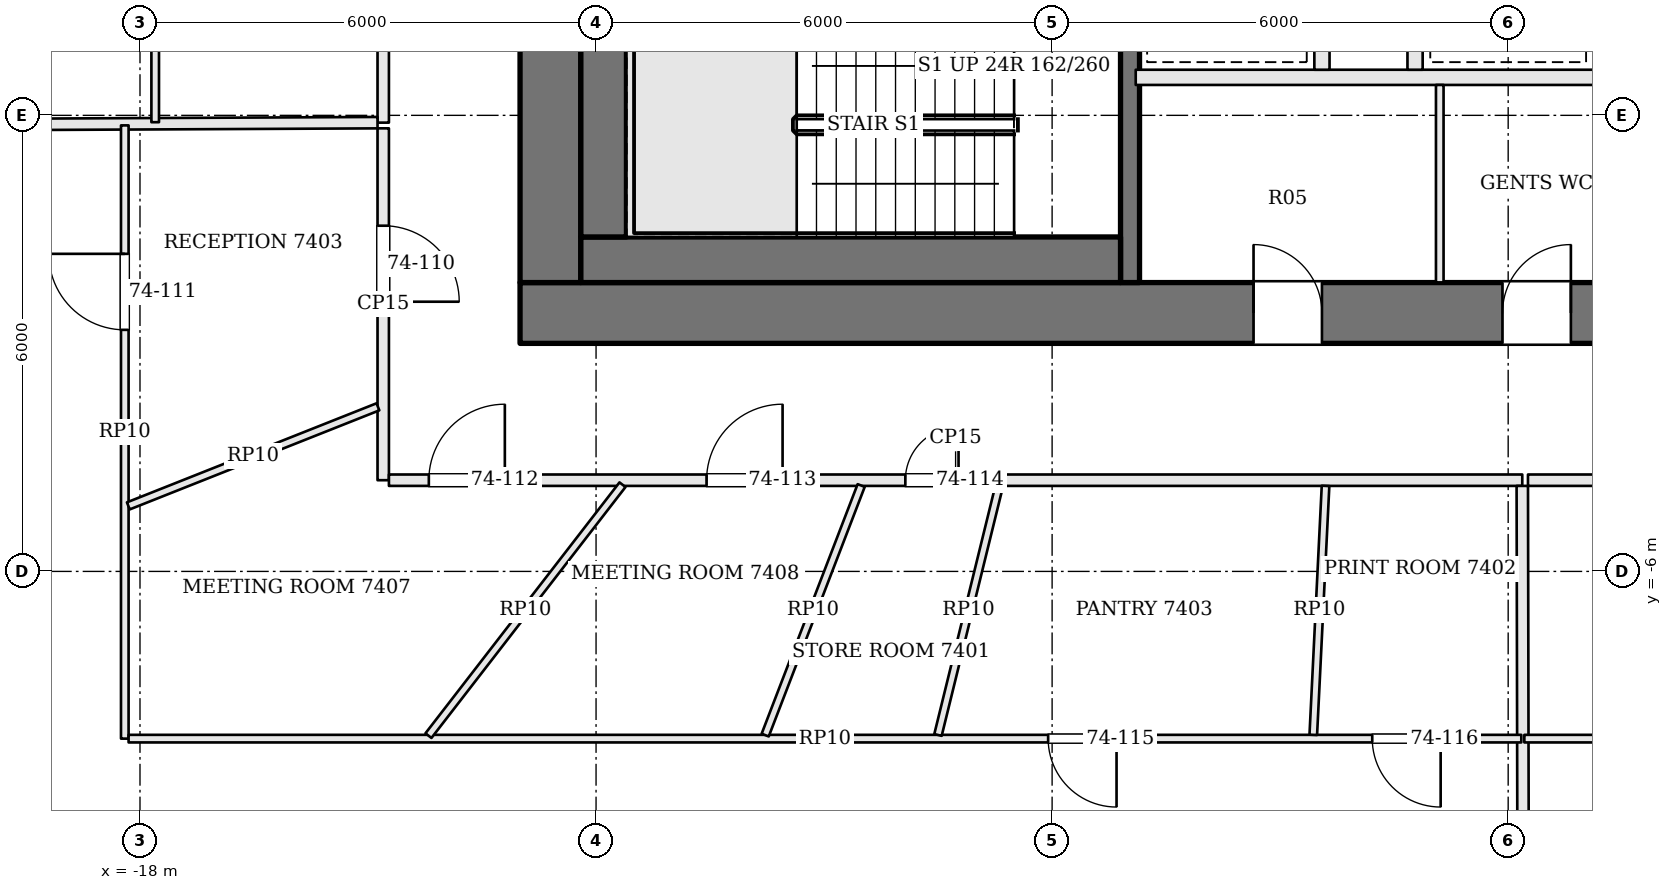
"""IFC4 building model, lengths in metres.
Left out: names, types, materials, properties, quantities, classifications, styles, units other than length and angle.
Written with IfcOpenShell. Run it as: python <this file> out.ifc"""

import sys

from ifc_helpers import new_model, si_unit, direction, frame, frame_2d, origin, place, context, subcontext, project, spatial, rectangle, extrude, element, fill, save


model = new_model("IFC4")
c1 = context("Model", 3, precision=1e-05, world=origin(), true_north=direction((0.0, 1.0)))
c2 = subcontext(c1, "Body", "Model", "MODEL_VIEW")
j1 = project(units=[si_unit("LENGTHUNIT", "METRE"), si_unit("PLANEANGLEUNIT", "RADIAN")], contexts=[c1])
p1 = place(None, origin())
s1 = spatial("IfcSite", under=j1, at=p1, CompositionType="ELEMENT")
p2 = place(p1, origin())
s2 = spatial("IfcBuilding", under=s1, at=p2, CompositionType="ELEMENT")
p3 = place(p2, frame((0.0, 0.0, 300.0)))
s3 = spatial("IfcBuildingStorey", under=s2, at=p3, CompositionType="ELEMENT", Elevation=300.0)
p4 = place(p3, frame((-13.0, -2.6, 0.0), z_axis=(0.0, 0.0, 1.0), x_axis=(1.0, 0.0, 0.0)))
e1 = element("IfcWall", 1, at=p4, inside=s3, PredefinedType="SHEAR", context=c2, shape_type="SweptSolid", body=[
    extrude(rectangle(XDim=26.0, YDim=0.8, at=frame_2d((13.0, 0.0))), origin(), (0.0, 0.0, 1.0), 3.9),
])
p5 = place(p4, frame((9.65, 0.0, 0.0)))
e2 = element("IfcOpeningElement", 2, at=p5, cuts=e1, PredefinedType="OPENING", context=c2, shape_type="SweptSolid", body=[
    extrude(rectangle(XDim=0.9, YDim=2.1, at=frame_2d((0.45, 1.05))), frame((0.0, 0.41, 0.0), z_axis=(0.0, -1.0, 0.0), x_axis=(1.0, 0.0, 0.0)), (0.0, 0.0, 1.0), 0.82),
])
p6 = place(p4, frame((12.925, 0.0, 0.0)))
e3 = element("IfcOpeningElement", 3, at=p6, cuts=e1, PredefinedType="OPENING", context=c2, shape_type="SweptSolid", body=[
    extrude(rectangle(XDim=0.9, YDim=2.1, at=frame_2d((0.45, 1.05))), frame((0.0, 0.41, 0.0), z_axis=(0.0, -1.0, 0.0), x_axis=(1.0, 0.0, 0.0)), (0.0, 0.0, 1.0), 0.82),
])
p7 = place(p4, frame((15.05, 0.0, 0.0)))
e4 = element("IfcOpeningElement", 4, at=p7, cuts=e1, PredefinedType="OPENING", context=c2, shape_type="SweptSolid", body=[
    extrude(rectangle(XDim=1.0, YDim=2.1, at=frame_2d((0.5, 1.05))), frame((0.0, 0.41, 0.0), z_axis=(0.0, -1.0, 0.0), x_axis=(1.0, 0.0, 0.0)), (0.0, 0.0, 1.0), 0.82),
])
p8 = place(p4, frame((16.825, 0.0, 0.0)))
e5 = element("IfcOpeningElement", 5, at=p8, cuts=e1, PredefinedType="OPENING", context=c2, shape_type="SweptSolid", body=[
    extrude(rectangle(XDim=0.7, YDim=2.1, at=frame_2d((0.35, 1.05))), frame((0.0, 0.41, 0.0), z_axis=(0.0, -1.0, 0.0), x_axis=(1.0, 0.0, 0.0)), (0.0, 0.0, 1.0), 0.82),
])
p9 = place(p3, frame((-12.6, -2.2, 0.0), z_axis=(0.0, 0.0, 1.0), x_axis=(0.0, 1.0, 0.0)))
e6 = element("IfcWall", 6, at=p9, inside=s3, PredefinedType="SHEAR", context=c2, shape_type="SweptSolid", body=[
    extrude(rectangle(XDim=13.4, YDim=0.8, at=frame_2d((6.7, 0.0))), origin(), (0.0, 0.0, 1.0), 3.9),
])
p10 = place(p9, frame((4.2, 0.0, 0.0)))
e7 = element("IfcOpeningElement", 7, at=p10, cuts=e6, PredefinedType="OPENING", context=c2, shape_type="SweptSolid", body=[
    extrude(rectangle(XDim=1.8, YDim=2.1, at=frame_2d((0.9, 1.05))), frame((0.0, 0.41, 0.0), z_axis=(0.0, -1.0, 0.0), x_axis=(1.0, 0.0, 0.0)), (0.0, 0.0, 1.0), 0.82),
])
p11 = place(p3, frame((-4.975, -2.2, 0.0), z_axis=(0.0, 0.0, 1.0), x_axis=(0.0, 1.0, 0.0)))
e8 = element("IfcWall", 8, at=p11, inside=s3, PredefinedType="SOLIDWALL", context=c2, shape_type="SweptSolid", body=[
    extrude(rectangle(XDim=13.4, YDim=0.25, at=frame_2d((6.7, 0.0))), origin(), (0.0, 0.0, 1.0), 3.7),
])
p12 = place(p11, frame((5.25, 0.0, 0.0)))
e9 = element("IfcOpeningElement", 9, at=p12, cuts=e8, PredefinedType="OPENING", context=c2, shape_type="SweptSolid", body=[
    extrude(rectangle(XDim=1.2, YDim=2.1, at=frame_2d((0.6, 1.05))), frame((0.0, 0.135, 0.0), z_axis=(0.0, -1.0, 0.0), x_axis=(1.0, 0.0, 0.0)), (0.0, 0.0, 1.0), 0.27),
])
p13 = place(p3, frame((-12.2, -1.9, 0.0), z_axis=(0.0, 0.0, 1.0), x_axis=(1.0, 0.0, 0.0)))
e10 = element("IfcWall", 10, at=p13, inside=s3, PredefinedType="SOLIDWALL", context=c2, shape_type="SweptSolid", body=[
    extrude(rectangle(XDim=7.1, YDim=0.6, at=frame_2d((3.55, 0.0))), origin(), (0.0, 0.0, 1.0), 3.7),
])
p14 = place(p3, frame((-11.9, -1.6, 0.0), z_axis=(0.0, 0.0, 1.0), x_axis=(0.0, 1.0, 0.0)))
e11 = element("IfcWall", 11, at=p14, inside=s3, PredefinedType="SOLIDWALL", context=c2, shape_type="SweptSolid", body=[
    extrude(rectangle(XDim=2.95, YDim=0.6, at=frame_2d((1.475, 0.0))), origin(), (0.0, 0.0, 1.0), 3.7),
])
p15 = place(p3, frame((-4.9, 0.5, 0.0), z_axis=(0.0, 0.0, 1.0), x_axis=(1.0, 0.0, 0.0)))
e12 = element("IfcWall", 12, at=p15, inside=s3, PredefinedType="SOLIDWALL", context=c2, shape_type="SweptSolid", body=[
    extrude(rectangle(XDim=9.8, YDim=0.2, at=frame_2d((4.9, 0.0))), origin(), (0.0, 0.0, 1.0), 3.7),
])
for number, where, z_axis, x_axis in (
    (13, (-2.45, 0.6, 0.0), (0.0, 0.0, 1.0), (0.0, 1.0, 0.0)),
    (14, (-1.225, 0.6, 0.0), (0.0, 0.0, 1.0), (0.0, 1.0, 0.0)),
):
    element("IfcWall", number, at=place(p3, frame(where, z_axis=z_axis, x_axis=x_axis)), inside=s3, PredefinedType="SOLIDWALL", context=c2, shape_type="SweptSolid", body=[
        extrude(rectangle(XDim=2.2, YDim=0.2, at=frame_2d((1.1, 0.0))), origin(), (0.0, 0.0, 1.0), 3.7),
    ])
p16 = place(p3, frame((-0.9, -2.2, 0.0), z_axis=(0.0, 0.0, 1.0), x_axis=(0.0, 1.0, 0.0)))
e15 = element("IfcWall", 15, at=p16, inside=s3, PredefinedType="PARTITIONING", context=c2, shape_type="SweptSolid", body=[
    extrude(rectangle(XDim=2.6, YDim=0.1, at=frame_2d((1.3, 0.0))), origin(), (0.0, 0.0, 1.0), 3.7),
])
p17 = place(p3, frame((-14.8, 13.725, 0.0), z_axis=(0.0, 0.0, 1.0), x_axis=(0.0, -1.0, 0.0)))
e16 = element("IfcWall", 16, at=p17, inside=s3, PredefinedType="PARTITIONING", context=c2, shape_type="SweptSolid", body=[
    extrude(rectangle(XDim=13.821, YDim=0.15, at=frame_2d((6.911, 0.0))), origin(), (0.0, 0.0, 1.0), 3.198),
])
p18 = place(p17, frame((4.143, 0.0, 0.0)))
e17 = element("IfcOpeningElement", 17, at=p18, cuts=e16, PredefinedType="OPENING", context=c2, shape_type="SweptSolid", body=[
    extrude(rectangle(XDim=1.0, YDim=2.4, at=frame_2d((0.5, 1.2))), frame((0.0, 0.085, 0.0), z_axis=(0.0, -1.0, 0.0), x_axis=(1.0, 0.0, 0.0)), (0.0, 0.0, 1.0), 0.17),
])
p19 = place(p17, frame((10.35, 0.0, 0.0)))
e18 = element("IfcOpeningElement", 18, at=p19, cuts=e16, PredefinedType="OPENING", context=c2, shape_type="SweptSolid", body=[
    extrude(rectangle(XDim=1.0, YDim=2.1, at=frame_2d((0.5, 1.05))), frame((0.0, 0.085, 0.0), z_axis=(0.0, -1.0, 0.0), x_axis=(1.0, 0.0, 0.0)), (0.0, 0.0, 1.0), 0.17),
])
p20 = place(p3, frame((-26.674, -0.152, 0.0), z_axis=(0.0, 0.0, 1.0), x_axis=(0.999988676395, 0.004758895005, 0.0)))
e19 = element("IfcWall", 19, at=p20, inside=s3, PredefinedType="PARTITIONING", context=c2, shape_type="SweptSolid", body=[
    extrude(rectangle(XDim=11.8, YDim=0.15, at=frame_2d((5.9, 0.0))), origin(), (0.0, 0.0, 1.0), 3.234),
])
p21 = place(p3, frame((-14.8, -0.171, 0.0), z_axis=(0.0, 0.0, 1.0), x_axis=(0.0, -1.0, 0.0)))
e20 = element("IfcWall", 20, at=p21, inside=s3, PredefinedType="PARTITIONING", context=c2, shape_type="SweptSolid", body=[
    extrude(rectangle(XDim=4.629, YDim=0.15, at=frame_2d((2.314, 0.0))), origin(), (0.0, 0.0, 1.0), 3.198),
])
p22 = place(p21, frame((1.281, 0.0, 0.0)))
e21 = element("IfcOpeningElement", 21, at=p22, cuts=e20, PredefinedType="OPENING", context=c2, shape_type="SweptSolid", body=[
    extrude(rectangle(XDim=1.0, YDim=2.1, at=frame_2d((0.5, 1.05))), frame((0.0, 0.085, 0.0), z_axis=(0.0, -1.0, 0.0), x_axis=(1.0, 0.0, 0.0)), (0.0, 0.0, 1.0), 0.17),
])
p23 = place(p3, frame((-14.725, -4.8, 0.0), z_axis=(0.0, 0.0, 1.0), x_axis=(1.0, 0.0, 0.0)))
e22 = element("IfcWall", 22, at=p23, inside=s3, PredefinedType="PARTITIONING", context=c2, shape_type="SweptSolid", body=[
    extrude(rectangle(XDim=14.911, YDim=0.15, at=frame_2d((7.455, 0.0))), origin(), (0.0, 0.0, 1.0), 3.198),
])
p24 = place(p23, frame((0.525, 0.0, 0.0)))
e23 = element("IfcOpeningElement", 23, at=p24, cuts=e22, PredefinedType="OPENING", context=c2, shape_type="SweptSolid", body=[
    extrude(rectangle(XDim=1.0, YDim=2.4, at=frame_2d((0.5, 1.2))), frame((0.0, 0.085, 0.0), z_axis=(0.0, -1.0, 0.0), x_axis=(1.0, 0.0, 0.0)), (0.0, 0.0, 1.0), 0.17),
])
p25 = place(p23, frame((4.179, 0.0, 0.0)))
e24 = element("IfcOpeningElement", 24, at=p25, cuts=e22, PredefinedType="OPENING", context=c2, shape_type="SweptSolid", body=[
    extrude(rectangle(XDim=1.0, YDim=2.4, at=frame_2d((0.5, 1.2))), frame((0.0, 0.085, 0.0), z_axis=(0.0, -1.0, 0.0), x_axis=(1.0, 0.0, 0.0)), (0.0, 0.0, 1.0), 0.17),
])
p26 = place(p23, frame((6.794, 0.0, 0.0)))
e25 = element("IfcOpeningElement", 25, at=p26, cuts=e22, PredefinedType="OPENING", context=c2, shape_type="SweptSolid", body=[
    extrude(rectangle(XDim=0.7, YDim=2.1, at=frame_2d((0.35, 1.05))), frame((0.0, 0.085, 0.0), z_axis=(0.0, -1.0, 0.0), x_axis=(1.0, 0.0, 0.0)), (0.0, 0.0, 1.0), 0.17),
])
p27 = place(p3, frame((0.213, -17.994, 0.0), z_axis=(0.0, 0.0, 1.0), x_axis=(-0.002102907791, 0.999997788887, 0.0)))
e26 = element("IfcWall", 26, at=p27, inside=s3, PredefinedType="PARTITIONING", context=c2, shape_type="SweptSolid", body=[
    extrude(rectangle(XDim=13.119, YDim=0.15, at=frame_2d((6.56, 0.0))), origin(), (0.0, 0.0, 1.0), 3.234),
])
p28 = place(p3, frame((0.26, -4.8, 0.0), z_axis=(0.0, 0.0, 1.0), x_axis=(1.0, 0.0, 0.0)))
e27 = element("IfcWall", 27, at=p28, inside=s3, PredefinedType="PARTITIONING", context=c2, shape_type="SweptSolid", body=[
    extrude(rectangle(XDim=14.54, YDim=0.15, at=frame_2d((7.27, 0.0))), origin(), (0.0, 0.0, 1.0), 3.198),
])
p29 = place(p28, frame((2.238, 0.0, 0.0)))
e28 = element("IfcOpeningElement", 28, at=p29, cuts=e27, PredefinedType="OPENING", context=c2, shape_type="SweptSolid", body=[
    extrude(rectangle(XDim=1.8, YDim=2.1, at=frame_2d((0.9, 1.05))), frame((0.0, 0.085, 0.0), z_axis=(0.0, -1.0, 0.0), x_axis=(1.0, 0.0, 0.0)), (0.0, 0.0, 1.0), 0.17),
])
p30 = place(p28, frame((8.441, 0.0, 0.0)))
e29 = element("IfcOpeningElement", 29, at=p30, cuts=e27, PredefinedType="OPENING", context=c2, shape_type="SweptSolid", body=[
    extrude(rectangle(XDim=1.0, YDim=2.4, at=frame_2d((0.5, 1.2))), frame((0.0, 0.085, 0.0), z_axis=(0.0, -1.0, 0.0), x_axis=(1.0, 0.0, 0.0)), (0.0, 0.0, 1.0), 0.17),
])
p31 = place(p28, frame((13.0, 0.0, 0.0)))
e30 = element("IfcOpeningElement", 30, at=p31, cuts=e27, PredefinedType="OPENING", context=c2, shape_type="SweptSolid", body=[
    extrude(rectangle(XDim=1.0, YDim=2.4, at=frame_2d((0.5, 1.2))), frame((0.0, 0.085, 0.0), z_axis=(0.0, -1.0, 0.0), x_axis=(1.0, 0.0, 0.0)), (0.0, 0.0, 1.0), 0.17),
])
p32 = place(p3, frame((-17.8, -0.09, 0.0), z_axis=(0.0, 0.0, 1.0), x_axis=(0.0, 1.0, 0.0)))
e31 = element("IfcWall", 31, at=p32, inside=s3, PredefinedType="PARTITIONING", context=c2, shape_type="SweptSolid", body=[
    extrude(rectangle(XDim=11.447, YDim=0.1, at=frame_2d((5.724, 0.0))), origin(), (0.0, 0.0, 1.0), 3.184),
])
p33 = place(p32, frame((2.748, 0.0, 0.0)))
e32 = element("IfcOpeningElement", 32, at=p33, cuts=e31, PredefinedType="OPENING", context=c2, shape_type="SweptSolid", body=[
    extrude(rectangle(XDim=0.9, YDim=2.1, at=frame_2d((0.45, 1.05))), frame((0.0, 0.06, 0.0), z_axis=(0.0, -1.0, 0.0), x_axis=(1.0, 0.0, 0.0)), (0.0, 0.0, 1.0), 0.12),
])
p34 = place(p3, frame((-18.2, -8.2, 0.0), z_axis=(0.0, 0.0, 1.0), x_axis=(0.0, 1.0, 0.0)))
e33 = element("IfcWall", 33, at=p34, inside=s3, PredefinedType="PARTITIONING", context=c2, shape_type="SweptSolid", body=[
    extrude(rectangle(XDim=8.068, YDim=0.1, at=frame_2d((4.034, 0.0))), origin(), (0.0, 0.0, 1.0), 3.184),
])
p35 = place(p34, frame((5.378, 0.0, 0.0)))
e34 = element("IfcOpeningElement", 34, at=p35, cuts=e33, PredefinedType="OPENING", context=c2, shape_type="SweptSolid", body=[
    extrude(rectangle(XDim=1.0, YDim=2.1, at=frame_2d((0.5, 1.05))), frame((0.0, 0.06, 0.0), z_axis=(0.0, -1.0, 0.0), x_axis=(1.0, 0.0, 0.0)), (0.0, 0.0, 1.0), 0.12),
])
p36 = place(p3, frame((0.173, -8.2, 0.0), z_axis=(0.0, 0.0, 1.0), x_axis=(-1.0, 0.0, 0.0)))
e35 = element("IfcWall", 35, at=p36, inside=s3, PredefinedType="PARTITIONING", context=c2, shape_type="SweptSolid", body=[
    extrude(rectangle(XDim=18.323, YDim=0.1, at=frame_2d((9.161, 0.0))), origin(), (0.0, 0.0, 1.0), 3.184),
])
p37 = place(p36, frame((5.325, 0.0, 0.0)))
e36 = element("IfcOpeningElement", 36, at=p37, cuts=e35, PredefinedType="OPENING", context=c2, shape_type="SweptSolid", body=[
    extrude(rectangle(XDim=0.9, YDim=2.1, at=frame_2d((0.45, 1.05))), frame((0.0, 0.06, 0.0), z_axis=(0.0, -1.0, 0.0), x_axis=(1.0, 0.0, 0.0)), (0.0, 0.0, 1.0), 0.12),
])
p38 = place(p36, frame((1.061, 0.0, 0.0)))
e37 = element("IfcOpeningElement", 37, at=p38, cuts=e35, PredefinedType="OPENING", context=c2, shape_type="SweptSolid", body=[
    extrude(rectangle(XDim=0.9, YDim=2.1, at=frame_2d((0.45, 1.05))), frame((0.0, 0.06, 0.0), z_axis=(0.0, -1.0, 0.0), x_axis=(1.0, 0.0, 0.0)), (0.0, 0.0, 1.0), 0.12),
])
p39 = place(p3, frame((-14.87, -3.835, 0.0), z_axis=(0.0, 0.0, 1.0), x_axis=(-0.9294835662, -0.368863525119, 0.0)))
e38 = element("IfcWall", 38, at=p39, inside=s3, PredefinedType="PARTITIONING", context=c2, shape_type="SweptSolid", body=[
    extrude(rectangle(XDim=3.533, YDim=0.1, at=frame_2d((1.767, 0.0))), origin(), (0.0, 0.0, 1.0), 3.184),
])
p40 = place(p3, frame((-11.652, -4.859, 0.0), z_axis=(0.0, 0.0, 1.0), x_axis=(-0.611775464036, -0.791031466886, 0.0)))
e39 = element("IfcWall", 39, at=p40, inside=s3, PredefinedType="PARTITIONING", context=c2, shape_type="SweptSolid", body=[
    extrude(rectangle(XDim=4.173, YDim=0.1, at=frame_2d((2.086, 0.0))), origin(), (0.0, 0.0, 1.0), 3.184),
])
p41 = place(p3, frame((-8.512, -4.87, 0.0), z_axis=(0.0, 0.0, 1.0), x_axis=(-0.359020935305, -0.933329506666, 0.0)))
e40 = element("IfcWall", 40, at=p41, inside=s3, PredefinedType="PARTITIONING", context=c2, shape_type="SweptSolid", body=[
    extrude(rectangle(XDim=3.518, YDim=0.1, at=frame_2d((1.759, 0.0))), origin(), (0.0, 0.0, 1.0), 3.184),
])
p42 = place(p3, frame((-6.695, -4.873, 0.0), z_axis=(0.0, 0.0, 1.0), x_axis=(-0.23877358923, -0.971075266437, 0.0)))
e41 = element("IfcWall", 41, at=p42, inside=s3, PredefinedType="PARTITIONING", context=c2, shape_type="SweptSolid", body=[
    extrude(rectangle(XDim=3.376, YDim=0.1, at=frame_2d((1.688, 0.0))), origin(), (0.0, 0.0, 1.0), 3.184),
])
p43 = place(p3, frame((-2.403, -4.875, 0.0), z_axis=(0.0, 0.0, 1.0), x_axis=(-0.049213496403, -0.998788281755, 0.0)))
e42 = element("IfcWall", 42, at=p43, inside=s3, PredefinedType="PARTITIONING", context=c2, shape_type="SweptSolid", body=[
    extrude(rectangle(XDim=3.279, YDim=0.1, at=frame_2d((1.64, 0.0))), origin(), (0.0, 0.0, 1.0), 3.184),
])
p44 = place(p3, frame((18.15, -8.2, 0.0), z_axis=(0.0, 0.0, 1.0), x_axis=(-1.0, 0.0, 0.0)))
e43 = element("IfcWall", 43, at=p44, inside=s3, PredefinedType="PARTITIONING", context=c2, shape_type="SweptSolid", body=[
    extrude(rectangle(XDim=17.937, YDim=0.1, at=frame_2d((8.969, 0.0))), origin(), (0.0, 0.0, 1.0), 3.184),
])
p45 = place(p44, frame((13.57, 0.0, 0.0)))
e44 = element("IfcOpeningElement", 44, at=p45, cuts=e43, PredefinedType="OPENING", context=c2, shape_type="SweptSolid", body=[
    extrude(rectangle(XDim=1.0, YDim=2.1, at=frame_2d((0.5, 1.05))), frame((0.0, 0.06, 0.0), z_axis=(0.0, -1.0, 0.0), x_axis=(1.0, 0.0, 0.0)), (0.0, 0.0, 1.0), 0.12),
])
p46 = place(p5, origin())
e45 = element("IfcDoor", 45, at=p46, inside=s3, OperationType="SINGLE_SWING_LEFT", PredefinedType="DOOR", context=c2, shape_type="SweptSolid", body=[
    extrude(rectangle(XDim=0.9, YDim=2.1, at=frame_2d((0.45, 1.05))), frame((0.0, 0.025, 0.0), z_axis=(0.0, -1.0, 0.0), x_axis=(1.0, 0.0, 0.0)), (0.0, 0.0, 1.0), 0.05),
])
fill(e2, e45)
p47 = place(p6, origin())
e46 = element("IfcDoor", 46, at=p47, inside=s3, OperationType="SINGLE_SWING_RIGHT", PredefinedType="DOOR", context=c2, shape_type="SweptSolid", body=[
    extrude(rectangle(XDim=0.9, YDim=2.1, at=frame_2d((0.45, 1.05))), frame((0.0, 0.025, 0.0), z_axis=(0.0, -1.0, 0.0), x_axis=(1.0, 0.0, 0.0)), (0.0, 0.0, 1.0), 0.05),
])
fill(e3, e46)
p48 = place(p22, origin())
e47 = element("IfcDoor", 47, at=p48, inside=s3, OperationType="SINGLE_SWING_RIGHT", PredefinedType="DOOR", context=c2, shape_type="SweptSolid", body=[
    extrude(rectangle(XDim=1.0, YDim=2.1, at=frame_2d((0.5, 1.05))), frame((0.0, 0.025, 0.0), z_axis=(0.0, -1.0, 0.0), x_axis=(1.0, 0.0, 0.0)), (0.0, 0.0, 1.0), 0.05),
])
fill(e21, e47)
p49 = place(p35, origin())
e48 = element("IfcDoor", 48, at=p49, inside=s3, OperationType="SINGLE_SWING_RIGHT", PredefinedType="DOOR", context=c2, shape_type="SweptSolid", body=[
    extrude(rectangle(XDim=1.0, YDim=2.1, at=frame_2d((0.5, 1.05))), frame((0.0, 0.025, 0.0), z_axis=(0.0, -1.0, 0.0), x_axis=(1.0, 0.0, 0.0)), (0.0, 0.0, 1.0), 0.05),
])
fill(e34, e48)
p50 = place(p24, origin())
e49 = element("IfcDoor", 49, at=p50, inside=s3, OperationType="SINGLE_SWING_RIGHT", PredefinedType="DOOR", context=c2, shape_type="SweptSolid", body=[
    extrude(rectangle(XDim=1.0, YDim=2.4, at=frame_2d((0.5, 1.2))), frame((0.0, 0.025, 0.0), z_axis=(0.0, -1.0, 0.0), x_axis=(1.0, 0.0, 0.0)), (0.0, 0.0, 1.0), 0.05),
])
fill(e23, e49)
p51 = place(p25, origin())
e50 = element("IfcDoor", 50, at=p51, inside=s3, OperationType="SINGLE_SWING_RIGHT", PredefinedType="DOOR", context=c2, shape_type="SweptSolid", body=[
    extrude(rectangle(XDim=1.0, YDim=2.4, at=frame_2d((0.5, 1.2))), frame((0.0, 0.025, 0.0), z_axis=(0.0, -1.0, 0.0), x_axis=(1.0, 0.0, 0.0)), (0.0, 0.0, 1.0), 0.05),
])
fill(e24, e50)
p52 = place(p26, origin())
e51 = element("IfcDoor", 51, at=p52, inside=s3, OperationType="SINGLE_SWING_RIGHT", PredefinedType="DOOR", context=c2, shape_type="SweptSolid", body=[
    extrude(rectangle(XDim=0.7, YDim=2.1, at=frame_2d((0.35, 1.05))), frame((0.0, 0.025, 0.0), z_axis=(0.0, -1.0, 0.0), x_axis=(1.0, 0.0, 0.0)), (0.0, 0.0, 1.0), 0.05),
])
fill(e25, e51)
p53 = place(p37, origin())
e52 = element("IfcDoor", 52, at=p53, inside=s3, OperationType="SINGLE_SWING_LEFT", PredefinedType="DOOR", context=c2, shape_type="SweptSolid", body=[
    extrude(rectangle(XDim=0.9, YDim=2.1, at=frame_2d((0.45, 1.05))), frame((0.0, 0.025, 0.0), z_axis=(0.0, -1.0, 0.0), x_axis=(1.0, 0.0, 0.0)), (0.0, 0.0, 1.0), 0.05),
])
fill(e36, e52)
p54 = place(p38, origin())
e53 = element("IfcDoor", 53, at=p54, inside=s3, OperationType="SINGLE_SWING_LEFT", PredefinedType="DOOR", context=c2, shape_type="SweptSolid", body=[
    extrude(rectangle(XDim=0.9, YDim=2.1, at=frame_2d((0.45, 1.05))), frame((0.0, 0.025, 0.0), z_axis=(0.0, -1.0, 0.0), x_axis=(1.0, 0.0, 0.0)), (0.0, 0.0, 1.0), 0.05),
])
fill(e37, e53)
save(model, sys.argv[1])
